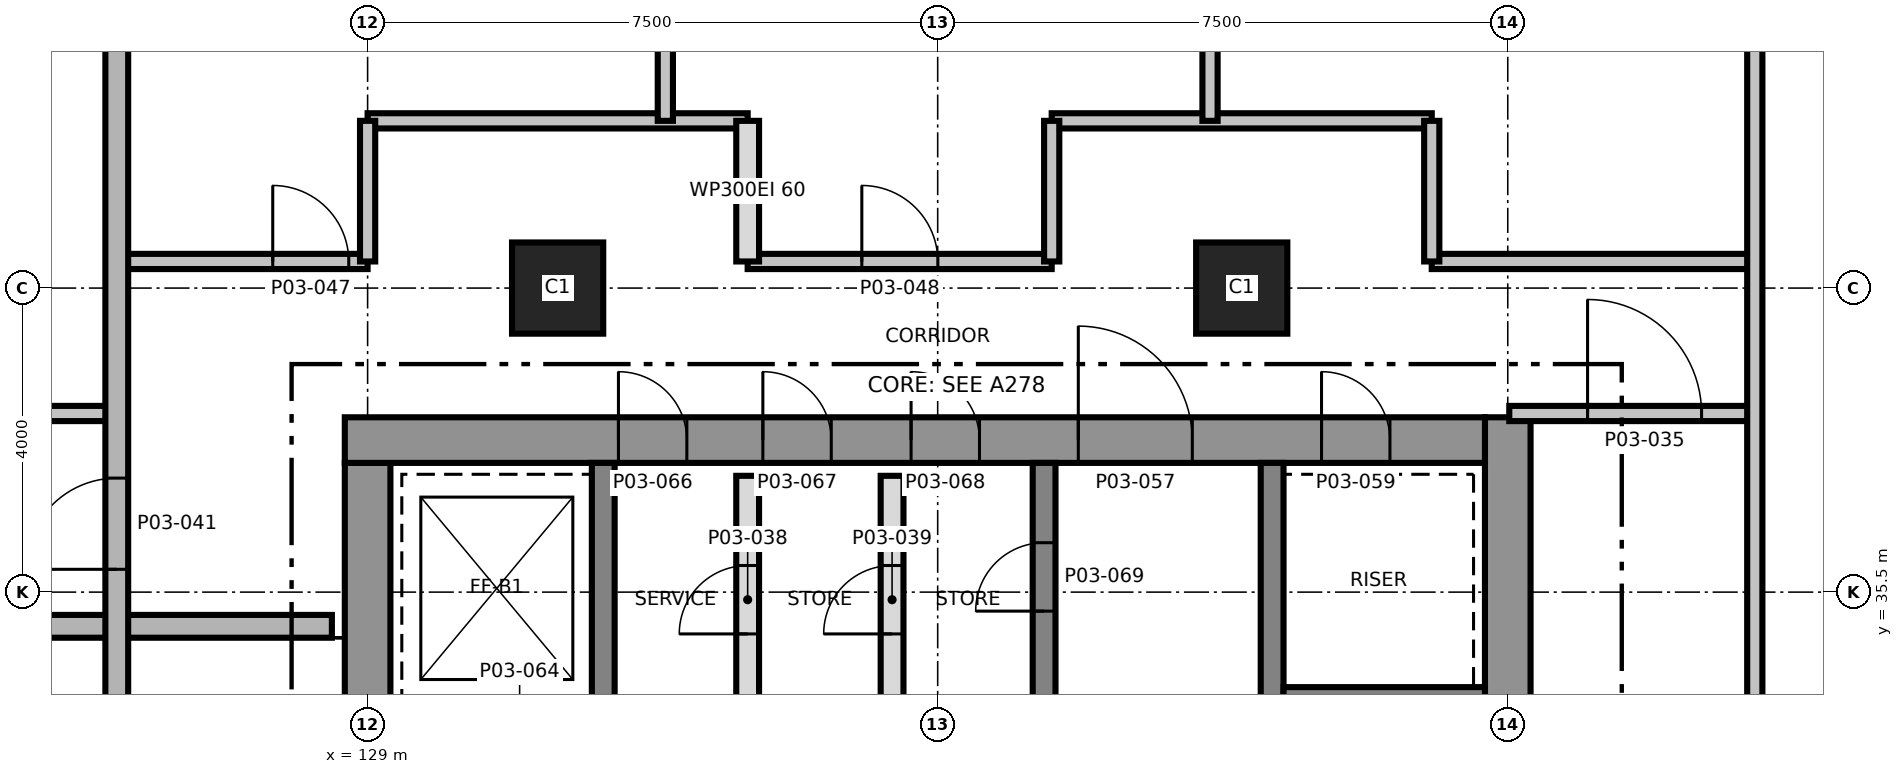
"""IFC4 building model, lengths in metres.
Left out: names, types, materials, properties, quantities, classifications, styles, units other than length and angle.
Written with IfcOpenShell. Run it as: python <this file> out.ifc"""

import sys

from ifc_helpers import new_model, si_unit, direction, frame, frame_2d, origin, origin_2d, place, context, subcontext, project, spatial, rectangle, extrude, element, fill, save


model = new_model("IFC4")
c1 = context("Model", 3, precision=1e-05, world=origin(), true_north=direction((0.0, 1.0)))
c2 = subcontext(c1, "Body", "Model", "MODEL_VIEW")
j1 = project(units=[si_unit("LENGTHUNIT", "METRE"), si_unit("PLANEANGLEUNIT", "RADIAN")], contexts=[c1])
p1 = place(None, origin())
s1 = spatial("IfcSite", under=j1, at=p1, CompositionType="ELEMENT")
p2 = place(p1, origin())
s2 = spatial("IfcBuilding", under=s1, at=p2, CompositionType="ELEMENT")
p3 = place(p2, frame((0.0, 0.0, 18.5)))
s3 = spatial("IfcBuildingStorey", under=s2, at=p3, CompositionType="ELEMENT", Elevation=18.5)
p4 = place(p3, frame((129.0, 24.8, 0.0), z_axis=(0.0, 0.0, 1.0), x_axis=(0.0, 1.0, 0.0)))
e1 = element("IfcWall", 1, at=p4, inside=s3, PredefinedType="SHEAR", context=c2, shape_type="SweptSolid", body=[
    extrude(rectangle(XDim=12.4, YDim=0.6, at=frame_2d((6.2, 0.0))), origin(), (0.0, 0.0, 1.0), 5.0),
])
p5 = place(p4, frame((5.15, 0.0, 0.0)))
e2 = element("IfcOpeningElement", 2, at=p5, cuts=e1, PredefinedType="OPENING", context=c2, shape_type="SweptSolid", body=[
    extrude(rectangle(XDim=1.0, YDim=2.1, at=frame_2d((0.5, 1.05))), frame((0.0, 0.31, 0.0), z_axis=(0.0, -1.0, 0.0), x_axis=(1.0, 0.0, 0.0)), (0.0, 0.0, 1.0), 0.62),
])
p6 = place(p3, frame((144.0, 24.2, 0.0), z_axis=(0.0, 0.0, 1.0), x_axis=(0.0, 1.0, 0.0)))
e3 = element("IfcWall", 3, at=p6, inside=s3, PredefinedType="SHEAR", context=c2, shape_type="SweptSolid", body=[
    extrude(rectangle(XDim=13.6, YDim=0.6, at=frame_2d((6.8, 0.0))), origin(), (0.0, 0.0, 1.0), 5.0),
])
p7 = place(p3, frame((128.7, 37.5, 0.0), z_axis=(0.0, 0.0, 1.0), x_axis=(1.0, 0.0, 0.0)))
e4 = element("IfcWall", 4, at=p7, inside=s3, PredefinedType="SHEAR", context=c2, shape_type="SweptSolid", body=[
    extrude(rectangle(XDim=15.0, YDim=0.6, at=frame_2d((7.5, 0.0))), origin(), (0.0, 0.0, 1.0), 5.0),
])
p8 = place(p7, frame((9.65, 0.0, 0.0)))
e5 = element("IfcOpeningElement", 5, at=p8, cuts=e4, PredefinedType="OPENING", context=c2, shape_type="SweptSolid", body=[
    extrude(rectangle(XDim=1.5, YDim=2.1, at=frame_2d((0.75, 1.05))), frame((0.0, 0.31, 0.0), z_axis=(0.0, -1.0, 0.0), x_axis=(1.0, 0.0, 0.0)), (0.0, 0.0, 1.0), 0.62),
])
p9 = place(p7, frame((12.85, 0.0, 0.0)))
e6 = element("IfcOpeningElement", 6, at=p9, cuts=e4, PredefinedType="OPENING", context=c2, shape_type="SweptSolid", body=[
    extrude(rectangle(XDim=0.9, YDim=2.1, at=frame_2d((0.45, 1.05))), frame((0.0, 0.31, 0.0), z_axis=(0.0, -1.0, 0.0), x_axis=(1.0, 0.0, 0.0)), (0.0, 0.0, 1.0), 0.62),
])
p10 = place(p7, frame((3.6, 0.0, 0.0)))
e7 = element("IfcOpeningElement", 7, at=p10, cuts=e4, PredefinedType="OPENING", context=c2, shape_type="SweptSolid", body=[
    extrude(rectangle(XDim=0.9, YDim=2.1, at=frame_2d((0.45, 1.05))), frame((0.0, 0.31, 0.0), z_axis=(0.0, -1.0, 0.0), x_axis=(1.0, 0.0, 0.0)), (0.0, 0.0, 1.0), 0.62),
])
p11 = place(p7, frame((5.5, 0.0, 0.0)))
e8 = element("IfcOpeningElement", 8, at=p11, cuts=e4, PredefinedType="OPENING", context=c2, shape_type="SweptSolid", body=[
    extrude(rectangle(XDim=0.9, YDim=2.1, at=frame_2d((0.45, 1.05))), frame((0.0, 0.31, 0.0), z_axis=(0.0, -1.0, 0.0), x_axis=(1.0, 0.0, 0.0)), (0.0, 0.0, 1.0), 0.62),
])
p12 = place(p7, frame((7.45, 0.0, 0.0)))
e9 = element("IfcOpeningElement", 9, at=p12, cuts=e4, PredefinedType="OPENING", context=c2, shape_type="SweptSolid", body=[
    extrude(rectangle(XDim=0.9, YDim=2.1, at=frame_2d((0.45, 1.05))), frame((0.0, 0.31, 0.0), z_axis=(0.0, -1.0, 0.0), x_axis=(1.0, 0.0, 0.0)), (0.0, 0.0, 1.0), 0.62),
])
p13 = place(p3, frame((132.1, 24.8, 0.0), z_axis=(0.0, 0.0, 1.0), x_axis=(0.0, 1.0, 0.0)))
e10 = element("IfcWall", 10, at=p13, inside=s3, PredefinedType="SHEAR", context=c2, shape_type="SweptSolid", body=[
    extrude(rectangle(XDim=12.4, YDim=0.3, at=frame_2d((6.2, 0.0))), origin(), (0.0, 0.0, 1.0), 5.0),
])
p14 = place(p13, frame((3.9, 0.0, 0.0)))
e11 = element("IfcOpeningElement", 11, at=p14, cuts=e10, PredefinedType="OPENING", context=c2, shape_type="SweptSolid", body=[
    extrude(rectangle(XDim=1.2, YDim=2.1, at=frame_2d((0.6, 1.05))), frame((0.0, 0.16, 0.0), z_axis=(0.0, -1.0, 0.0), x_axis=(1.0, 0.0, 0.0)), (0.0, 0.0, 1.0), 0.32),
])
p15 = place(p3, frame((137.9, 24.8, 0.0), z_axis=(0.0, 0.0, 1.0), x_axis=(0.0, 1.0, 0.0)))
e12 = element("IfcWall", 12, at=p15, inside=s3, PredefinedType="SHEAR", context=c2, shape_type="SweptSolid", body=[
    extrude(rectangle(XDim=12.4, YDim=0.3, at=frame_2d((6.2, 0.0))), origin(), (0.0, 0.0, 1.0), 5.0),
])
p16 = place(p15, frame((3.95, 0.0, 0.0)))
e13 = element("IfcOpeningElement", 13, at=p16, cuts=e12, PredefinedType="OPENING", context=c2, shape_type="SweptSolid", body=[
    extrude(rectangle(XDim=1.5, YDim=2.1, at=frame_2d((0.75, 1.05))), frame((0.0, 0.16, 0.0), z_axis=(0.0, -1.0, 0.0), x_axis=(1.0, 0.0, 0.0)), (0.0, 0.0, 1.0), 0.32),
])
p17 = place(p15, frame((10.45, 0.0, 0.0)))
e14 = element("IfcOpeningElement", 14, at=p17, cuts=e12, PredefinedType="OPENING", context=c2, shape_type="SweptSolid", body=[
    extrude(rectangle(XDim=0.9, YDim=2.1, at=frame_2d((0.45, 1.05))), frame((0.0, 0.16, 0.0), z_axis=(0.0, -1.0, 0.0), x_axis=(1.0, 0.0, 0.0)), (0.0, 0.0, 1.0), 0.32),
])
p18 = place(p3, frame((140.9, 24.8, 0.0), z_axis=(0.0, 0.0, 1.0), x_axis=(0.0, 1.0, 0.0)))
e15 = element("IfcWall", 15, at=p18, inside=s3, PredefinedType="SHEAR", context=c2, shape_type="SweptSolid", body=[
    extrude(rectangle(XDim=12.4, YDim=0.3, at=frame_2d((6.2, 0.0))), origin(), (0.0, 0.0, 1.0), 5.0),
])
p19 = place(p18, frame((5.9, 0.0, 0.0)))
e16 = element("IfcOpeningElement", 16, at=p19, cuts=e15, PredefinedType="OPENING", context=c2, shape_type="SweptSolid", body=[
    extrude(rectangle(XDim=1.2, YDim=2.1, at=frame_2d((0.6, 1.05))), frame((0.0, 0.16, 0.0), z_axis=(0.0, -1.0, 0.0), x_axis=(1.0, 0.0, 0.0)), (0.0, 0.0, 1.0), 0.32),
])
p20 = place(p3, frame((141.05, 34.1, 0.0), z_axis=(0.0, 0.0, 1.0), x_axis=(1.0, 0.0, 0.0)))
e17 = element("IfcWall", 17, at=p20, inside=s3, PredefinedType="SHEAR", context=c2, shape_type="SweptSolid", body=[
    extrude(rectangle(XDim=2.65, YDim=0.3, at=frame_2d((1.325, 0.0))), origin(), (0.0, 0.0, 1.0), 5.0),
])
for number, where, z_axis, x_axis in (
    (18, (131.5, 39.5, 0.0), (0.0, 0.0, 1.0), (1.0, 0.0, 0.0)),
    (19, (140.5, 39.5, 0.0), (0.0, 0.0, 1.0), (1.0, 0.0, 0.0)),
):
    element("IfcColumn", number, at=place(p3, frame(where, z_axis=z_axis, x_axis=x_axis)), inside=s3, PredefinedType="COLUMN", context=c2, shape_type="SweptSolid", body=[
        extrude(rectangle(XDim=1.2, YDim=1.2, at=origin_2d()), origin(), (0.0, 0.0, 1.0), 5.0),
    ])
p21 = place(p3, frame((114.6, 35.05, 0.0), z_axis=(0.0, 0.0, 1.0), x_axis=(1.0, 0.0, 0.0)))
e20 = element("IfcWall", 20, at=p21, inside=s3, PredefinedType="SHEAR", context=c2, shape_type="SweptSolid", body=[
    extrude(rectangle(XDim=13.93, YDim=0.3, at=frame_2d((6.965, 0.0))), origin(), (0.0, 0.0, 1.0), 4.7),
])
p22 = place(p21, frame((5.13, 0.0, 0.0)))
e21 = element("IfcOpeningElement", 21, at=p22, cuts=e20, PredefinedType="OPENING", context=c2, shape_type="SweptSolid", body=[
    extrude(rectangle(XDim=1.0, YDim=2.1, at=frame_2d((0.5, 1.05))), frame((0.0, 0.16, 0.0), z_axis=(0.0, -1.0, 0.0), x_axis=(1.0, 0.0, 0.0)), (0.0, 0.0, 1.0), 0.32),
])
p23 = place(p3, frame((114.6, 37.85, 0.0), z_axis=(0.0, 0.0, 1.0), x_axis=(1.0, 0.0, 0.0)))
e22 = element("IfcWall", 22, at=p23, inside=s3, PredefinedType="PARTITIONING", context=c2, shape_type="SweptSolid", body=[
    extrude(rectangle(XDim=11.15, YDim=0.2, at=frame_2d((5.575, 0.0))), origin(), (0.0, 0.0, 1.0), 4.7),
])
p24 = place(p23, frame((5.005, 0.0, 0.0)))
e23 = element("IfcOpeningElement", 23, at=p24, cuts=e22, PredefinedType="OPENING", context=c2, shape_type="SweptSolid", body=[
    extrude(rectangle(XDim=1.0, YDim=2.1, at=frame_2d((0.5, 1.05))), frame((0.0, 0.11, 0.0), z_axis=(0.0, -1.0, 0.0), x_axis=(1.0, 0.0, 0.0)), (0.0, 0.0, 1.0), 0.22),
])
p25 = place(p3, frame((144.02, 37.85, 0.0), z_axis=(0.0, 0.0, 1.0), x_axis=(1.0, 0.0, 0.0)))
e24 = element("IfcWall", 24, at=p25, inside=s3, PredefinedType="PARTITIONING", context=c2, shape_type="SweptSolid", body=[
    extrude(rectangle(XDim=3.23, YDim=0.2, at=frame_2d((1.615, 0.0))), origin(), (0.0, 0.0, 1.0), 4.7),
])
p26 = place(p25, frame((1.03, 0.0, 0.0)))
e25 = element("IfcOpeningElement", 25, at=p26, cuts=e24, PredefinedType="OPENING", context=c2, shape_type="SweptSolid", body=[
    extrude(rectangle(XDim=1.5, YDim=2.1, at=frame_2d((0.75, 1.05))), frame((0.0, 0.11, 0.0), z_axis=(0.0, -1.0, 0.0), x_axis=(1.0, 0.0, 0.0)), (0.0, 0.0, 1.0), 0.22),
])
p27 = place(p3, frame((125.75, 39.85, 0.0), z_axis=(0.0, 0.0, 1.0), x_axis=(1.0, 0.0, 0.0)))
e26 = element("IfcWall", 26, at=p27, inside=s3, PredefinedType="PARTITIONING", context=c2, shape_type="SweptSolid", body=[
    extrude(rectangle(XDim=3.25, YDim=0.2, at=frame_2d((1.625, 0.0))), origin(), (0.0, 0.0, 1.0), 4.7),
])
p28 = place(p27, frame((2.002, 0.0, 0.0)))
e27 = element("IfcOpeningElement", 27, at=p28, cuts=e26, PredefinedType="OPENING", context=c2, shape_type="SweptSolid", body=[
    extrude(rectangle(XDim=1.0, YDim=2.1, at=frame_2d((0.5, 1.05))), frame((0.0, 0.11, 0.0), z_axis=(0.0, -1.0, 0.0), x_axis=(1.0, 0.0, 0.0)), (0.0, 0.0, 1.0), 0.22),
])
p29 = place(p3, frame((134.0, 39.85, 0.0), z_axis=(0.0, 0.0, 1.0), x_axis=(1.0, 0.0, 0.0)))
e28 = element("IfcWall", 28, at=p29, inside=s3, PredefinedType="PARTITIONING", context=c2, shape_type="SweptSolid", body=[
    extrude(rectangle(XDim=4.0, YDim=0.2, at=frame_2d((2.0, 0.0))), origin(), (0.0, 0.0, 1.0), 4.7),
])
p30 = place(p29, frame((1.502, 0.0, 0.0)))
e29 = element("IfcOpeningElement", 29, at=p30, cuts=e28, PredefinedType="OPENING", context=c2, shape_type="SweptSolid", body=[
    extrude(rectangle(XDim=1.0, YDim=2.1, at=frame_2d((0.5, 1.05))), frame((0.0, 0.11, 0.0), z_axis=(0.0, -1.0, 0.0), x_axis=(1.0, 0.0, 0.0)), (0.0, 0.0, 1.0), 0.22),
])
p31 = place(p3, frame((143.0, 39.85, 0.0), z_axis=(0.0, 0.0, 1.0), x_axis=(1.0, 0.0, 0.0)))
e30 = element("IfcWall", 30, at=p31, inside=s3, PredefinedType="PARTITIONING", context=c2, shape_type="SweptSolid", body=[
    extrude(rectangle(XDim=4.25, YDim=0.2, at=frame_2d((2.125, 0.0))), origin(), (0.0, 0.0, 1.0), 4.7),
])
for number, where, z_axis, x_axis in (
    (31, (129.0, 41.7, 0.0), (0.0, 0.0, 1.0), (1.0, 0.0, 0.0)),
    (32, (138.0, 41.7, 0.0), (0.0, 0.0, 1.0), (1.0, 0.0, 0.0)),
):
    element("IfcWall", number, at=place(p3, frame(where, z_axis=z_axis, x_axis=x_axis)), inside=s3, PredefinedType="PARTITIONING", context=c2, shape_type="SweptSolid", body=[
        extrude(rectangle(XDim=5.0, YDim=0.2, at=frame_2d((2.5, 0.0))), origin(), (0.0, 0.0, 1.0), 4.7),
    ])
p32 = place(p3, frame((125.7, 11.07, 0.0), z_axis=(0.0, 0.0, 1.0), x_axis=(0.0, 1.0, 0.0)))
e33 = element("IfcWall", 33, at=p32, inside=s3, PredefinedType="SHEAR", context=c2, shape_type="SweptSolid", body=[
    extrude(rectangle(XDim=38.86, YDim=0.3, at=frame_2d((19.43, 0.0))), origin(), (0.0, 0.0, 1.0), 4.7),
])
p33 = place(p32, frame((24.73, 0.0, 0.0)))
e34 = element("IfcOpeningElement", 34, at=p33, cuts=e33, PredefinedType="OPENING", context=c2, shape_type="SweptSolid", body=[
    extrude(rectangle(XDim=1.2, YDim=2.1, at=frame_2d((0.6, 1.05))), frame((0.0, 0.16, 0.0), z_axis=(0.0, -1.0, 0.0), x_axis=(1.0, 0.0, 0.0)), (0.0, 0.0, 1.0), 0.32),
])
p34 = place(p3, frame((129.0, 39.85, 0.0), z_axis=(0.0, 0.0, 1.0), x_axis=(0.0, 1.0, 0.0)))
e35 = element("IfcWall", 35, at=p34, inside=s3, PredefinedType="PARTITIONING", context=c2, shape_type="SweptSolid", body=[
    extrude(rectangle(XDim=1.85, YDim=0.2, at=frame_2d((0.925, 0.0))), origin(), (0.0, 0.0, 1.0), 4.7),
])
p35 = place(p3, frame((132.917, 41.7, 0.0), z_axis=(0.0, 0.0, 1.0), x_axis=(0.0, 1.0, 0.0)))
e36 = element("IfcWall", 36, at=p35, inside=s3, PredefinedType="PARTITIONING", context=c2, shape_type="SweptSolid", body=[
    extrude(rectangle(XDim=8.23, YDim=0.2, at=frame_2d((4.115, 0.0))), origin(), (0.0, 0.0, 1.0), 4.7),
])
p36 = place(p3, frame((134.0, 33.77, 0.0), z_axis=(0.0, 0.0, 1.0), x_axis=(0.0, 1.0, 0.0)))
e37 = element("IfcWall", 37, at=p36, inside=s3, PredefinedType="PARTITIONING", context=c2, shape_type="SweptSolid", body=[
    extrude(rectangle(XDim=3.26, YDim=0.3, at=frame_2d((1.63, 0.0))), origin(), (0.0, 0.0, 1.0), 4.7),
])
p37 = place(p36, frame((1.18, 0.0, 0.0)))
e38 = element("IfcOpeningElement", 38, at=p37, cuts=e37, PredefinedType="OPENING", context=c2, shape_type="SweptSolid", body=[
    extrude(rectangle(XDim=0.9, YDim=2.1, at=frame_2d((0.45, 1.05))), frame((0.0, 0.16, 0.0), z_axis=(0.0, -1.0, 0.0), x_axis=(1.0, 0.0, 0.0)), (0.0, 0.0, 1.0), 0.32),
])
p38 = place(p3, frame((134.0, 39.85, 0.0), z_axis=(0.0, 0.0, 1.0), x_axis=(0.0, 1.0, 0.0)))
e39 = element("IfcWall", 39, at=p38, inside=s3, PredefinedType="PARTITIONING", context=c2, shape_type="SweptSolid", body=[
    extrude(rectangle(XDim=1.85, YDim=0.3, at=frame_2d((0.925, 0.0))), origin(), (0.0, 0.0, 1.0), 4.7),
])
p39 = place(p3, frame((135.9, 33.77, 0.0), z_axis=(0.0, 0.0, 1.0), x_axis=(0.0, 1.0, 0.0)))
e40 = element("IfcWall", 40, at=p39, inside=s3, PredefinedType="PARTITIONING", context=c2, shape_type="SweptSolid", body=[
    extrude(rectangle(XDim=3.26, YDim=0.3, at=frame_2d((1.63, 0.0))), origin(), (0.0, 0.0, 1.0), 4.7),
])
p40 = place(p39, frame((1.18, 0.0, 0.0)))
e41 = element("IfcOpeningElement", 41, at=p40, cuts=e40, PredefinedType="OPENING", context=c2, shape_type="SweptSolid", body=[
    extrude(rectangle(XDim=0.9, YDim=2.1, at=frame_2d((0.45, 1.05))), frame((0.0, 0.16, 0.0), z_axis=(0.0, -1.0, 0.0), x_axis=(1.0, 0.0, 0.0)), (0.0, 0.0, 1.0), 0.32),
])
p41 = place(p3, frame((138.0, 39.85, 0.0), z_axis=(0.0, 0.0, 1.0), x_axis=(0.0, 1.0, 0.0)))
e42 = element("IfcWall", 42, at=p41, inside=s3, PredefinedType="PARTITIONING", context=c2, shape_type="SweptSolid", body=[
    extrude(rectangle(XDim=1.85, YDim=0.2, at=frame_2d((0.925, 0.0))), origin(), (0.0, 0.0, 1.0), 4.7),
])
p42 = place(p3, frame((140.083, 41.7, 0.0), z_axis=(0.0, 0.0, 1.0), x_axis=(0.0, 1.0, 0.0)))
e43 = element("IfcWall", 43, at=p42, inside=s3, PredefinedType="PARTITIONING", context=c2, shape_type="SweptSolid", body=[
    extrude(rectangle(XDim=8.23, YDim=0.2, at=frame_2d((4.115, 0.0))), origin(), (0.0, 0.0, 1.0), 4.7),
])
p43 = place(p3, frame((143.0, 39.85, 0.0), z_axis=(0.0, 0.0, 1.0), x_axis=(0.0, 1.0, 0.0)))
e44 = element("IfcWall", 44, at=p43, inside=s3, PredefinedType="PARTITIONING", context=c2, shape_type="SweptSolid", body=[
    extrude(rectangle(XDim=1.85, YDim=0.2, at=frame_2d((0.925, 0.0))), origin(), (0.0, 0.0, 1.0), 4.7),
])
p44 = place(p3, frame((147.25, 11.07, 0.0), z_axis=(0.0, 0.0, 1.0), x_axis=(0.0, 1.0, 0.0)))
e45 = element("IfcWall", 45, at=p44, inside=s3, PredefinedType="PARTITIONING", context=c2, shape_type="SweptSolid", body=[
    extrude(rectangle(XDim=38.86, YDim=0.2, at=frame_2d((19.43, 0.0))), origin(), (0.0, 0.0, 1.0), 4.7),
])
p45 = place(p44, frame((18.18, 0.0, 0.0)))
e46 = element("IfcOpeningElement", 46, at=p45, cuts=e45, PredefinedType="OPENING", context=c2, shape_type="SweptSolid", body=[
    extrude(rectangle(XDim=1.5, YDim=2.1, at=frame_2d((0.75, 1.05))), frame((0.0, 0.11, 0.0), z_axis=(0.0, -1.0, 0.0), x_axis=(1.0, 0.0, 0.0)), (0.0, 0.0, 1.0), 0.22),
])
p46 = place(p44, frame((33.239, 0.0, 0.0)))
e47 = element("IfcOpeningElement", 47, at=p46, cuts=e45, PredefinedType="OPENING", context=c2, shape_type="SweptSolid", body=[
    extrude(rectangle(XDim=1.0, YDim=2.1, at=frame_2d((0.5, 1.05))), frame((0.0, 0.11, 0.0), z_axis=(0.0, -1.0, 0.0), x_axis=(1.0, 0.0, 0.0)), (0.0, 0.0, 1.0), 0.22),
])
p47 = place(p26, origin())
e48 = element("IfcDoor", 48, at=p47, inside=s3, OperationType="SINGLE_SWING_LEFT", PredefinedType="DOOR", context=c2, shape_type="SweptSolid", body=[
    extrude(rectangle(XDim=1.5, YDim=2.1, at=frame_2d((0.75, 1.05))), frame((0.0, 0.025, 0.0), z_axis=(0.0, -1.0, 0.0), x_axis=(1.0, 0.0, 0.0)), (0.0, 0.0, 1.0), 0.05),
])
fill(e25, e48)
p48 = place(p37, origin())
e49 = element("IfcDoor", 49, at=p48, inside=s3, OperationType="SINGLE_SWING_RIGHT", PredefinedType="DOOR", context=c2, shape_type="SweptSolid", body=[
    extrude(rectangle(XDim=0.9, YDim=2.1, at=frame_2d((0.45, 1.05))), frame((0.0, 0.025, 0.0), z_axis=(0.0, -1.0, 0.0), x_axis=(1.0, 0.0, 0.0)), (0.0, 0.0, 1.0), 0.05),
])
fill(e38, e49)
p49 = place(p40, origin())
e50 = element("IfcDoor", 50, at=p49, inside=s3, OperationType="SINGLE_SWING_LEFT", PredefinedType="DOOR", context=c2, shape_type="SweptSolid", body=[
    extrude(rectangle(XDim=0.9, YDim=2.1, at=frame_2d((0.45, 1.05))), frame((0.0, 0.025, 0.0), z_axis=(0.0, -1.0, 0.0), x_axis=(1.0, 0.0, 0.0)), (0.0, 0.0, 1.0), 0.05),
])
fill(e41, e50)
p50 = place(p33, origin())
e51 = element("IfcDoor", 51, at=p50, inside=s3, OperationType="SINGLE_SWING_LEFT", PredefinedType="DOOR", context=c2, shape_type="SweptSolid", body=[
    extrude(rectangle(XDim=1.2, YDim=2.1, at=frame_2d((0.6, 1.05))), frame((0.0, 0.025, 0.0), z_axis=(0.0, -1.0, 0.0), x_axis=(1.0, 0.0, 0.0)), (0.0, 0.0, 1.0), 0.05),
])
fill(e34, e51)
p51 = place(p28, origin())
e52 = element("IfcDoor", 52, at=p51, inside=s3, OperationType="SINGLE_SWING_LEFT", PredefinedType="DOOR", context=c2, shape_type="SweptSolid", body=[
    extrude(rectangle(XDim=1.0, YDim=2.1, at=frame_2d((0.5, 1.05))), frame((0.0, 0.025, 0.0), z_axis=(0.0, -1.0, 0.0), x_axis=(1.0, 0.0, 0.0)), (0.0, 0.0, 1.0), 0.05),
])
fill(e27, e52)
p52 = place(p30, origin())
e53 = element("IfcDoor", 53, at=p52, inside=s3, OperationType="SINGLE_SWING_RIGHT", PredefinedType="DOOR", context=c2, shape_type="SweptSolid", body=[
    extrude(rectangle(XDim=1.0, YDim=2.1, at=frame_2d((0.5, 1.05))), frame((0.0, 0.025, 0.0), z_axis=(0.0, -1.0, 0.0), x_axis=(1.0, 0.0, 0.0)), (0.0, 0.0, 1.0), 0.05),
])
fill(e29, e53)
p53 = place(p8, origin())
e54 = element("IfcDoor", 54, at=p53, inside=s3, OperationType="SINGLE_SWING_RIGHT", PredefinedType="DOOR", context=c2, shape_type="SweptSolid", body=[
    extrude(rectangle(XDim=1.5, YDim=2.1, at=frame_2d((0.75, 1.05))), frame((0.0, 0.025, 0.0), z_axis=(0.0, -1.0, 0.0), x_axis=(1.0, 0.0, 0.0)), (0.0, 0.0, 1.0), 0.05),
])
fill(e5, e54)
p54 = place(p9, origin())
e55 = element("IfcDoor", 55, at=p54, inside=s3, OperationType="SINGLE_SWING_RIGHT", PredefinedType="DOOR", context=c2, shape_type="SweptSolid", body=[
    extrude(rectangle(XDim=0.9, YDim=2.1, at=frame_2d((0.45, 1.05))), frame((0.0, 0.025, 0.0), z_axis=(0.0, -1.0, 0.0), x_axis=(1.0, 0.0, 0.0)), (0.0, 0.0, 1.0), 0.05),
])
fill(e6, e55)
p55 = place(p10, origin())
e56 = element("IfcDoor", 56, at=p55, inside=s3, OperationType="SINGLE_SWING_LEFT", PredefinedType="DOOR", context=c2, shape_type="SweptSolid", body=[
    extrude(rectangle(XDim=0.9, YDim=2.1, at=frame_2d((0.45, 1.05))), frame((0.0, 0.025, 0.0), z_axis=(0.0, -1.0, 0.0), x_axis=(1.0, 0.0, 0.0)), (0.0, 0.0, 1.0), 0.05),
])
fill(e7, e56)
p56 = place(p11, origin())
e57 = element("IfcDoor", 57, at=p56, inside=s3, OperationType="SINGLE_SWING_RIGHT", PredefinedType="DOOR", context=c2, shape_type="SweptSolid", body=[
    extrude(rectangle(XDim=0.9, YDim=2.1, at=frame_2d((0.45, 1.05))), frame((0.0, 0.025, 0.0), z_axis=(0.0, -1.0, 0.0), x_axis=(1.0, 0.0, 0.0)), (0.0, 0.0, 1.0), 0.05),
])
fill(e8, e57)
p57 = place(p12, origin())
e58 = element("IfcDoor", 58, at=p57, inside=s3, OperationType="SINGLE_SWING_LEFT", PredefinedType="DOOR", context=c2, shape_type="SweptSolid", body=[
    extrude(rectangle(XDim=0.9, YDim=2.1, at=frame_2d((0.45, 1.05))), frame((0.0, 0.025, 0.0), z_axis=(0.0, -1.0, 0.0), x_axis=(1.0, 0.0, 0.0)), (0.0, 0.0, 1.0), 0.05),
])
fill(e9, e58)
p58 = place(p17, origin())
e59 = element("IfcDoor", 59, at=p58, inside=s3, OperationType="SINGLE_SWING_RIGHT", PredefinedType="DOOR", context=c2, shape_type="SweptSolid", body=[
    extrude(rectangle(XDim=0.9, YDim=2.1, at=frame_2d((0.45, 1.05))), frame((0.0, 0.025, 0.0), z_axis=(0.0, -1.0, 0.0), x_axis=(1.0, 0.0, 0.0)), (0.0, 0.0, 1.0), 0.05),
])
fill(e14, e59)
save(model, sys.argv[1])
